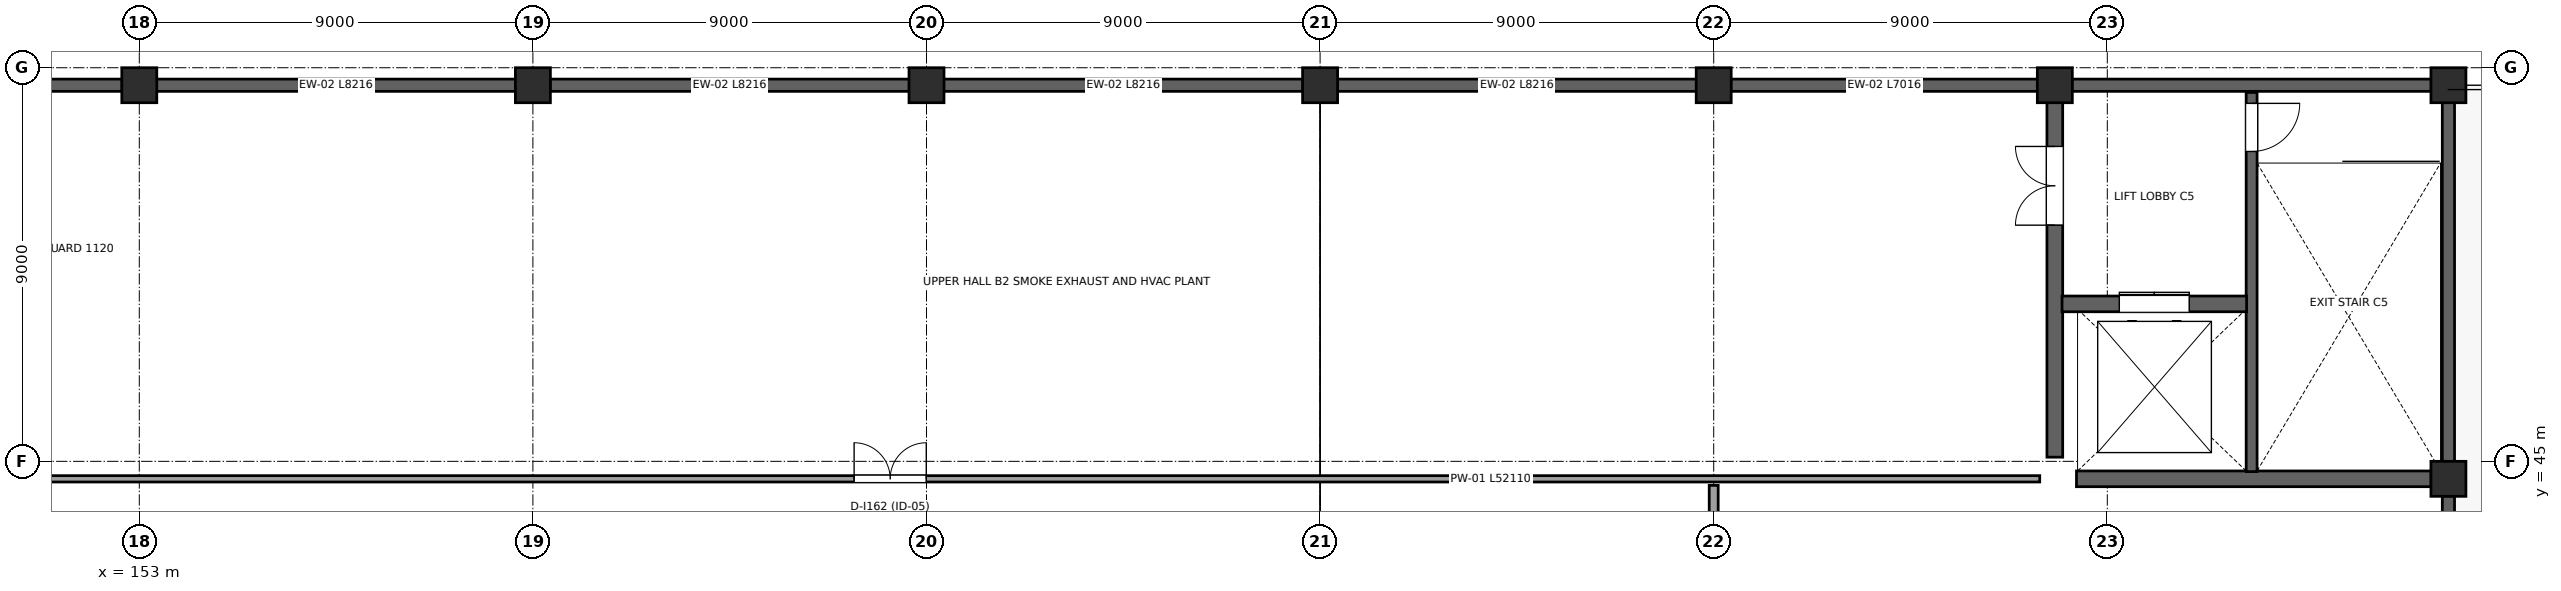
"""IFC4 building model, lengths in metres.
Left out: names, types, materials, properties, quantities, classifications, styles, units other than length and angle.
Written with IfcOpenShell. Run it as: python <this file> out.ifc"""

import sys

from ifc_helpers import new_model, si_unit, direction, frame, frame_2d, origin, origin_2d, place, context, subcontext, project, spatial, rectangle, extrude, element, fill, save


model = new_model("IFC4")
c1 = context("Model", 3, precision=1e-05, world=origin(), true_north=direction((0.0, 1.0)))
c2 = subcontext(c1, "Body", "Model", "MODEL_VIEW")
j1 = project(units=[si_unit("LENGTHUNIT", "METRE"), si_unit("PLANEANGLEUNIT", "RADIAN")], contexts=[c1])
p1 = place(None, origin())
s1 = spatial("IfcSite", under=j1, at=p1, CompositionType="ELEMENT")
p2 = place(p1, origin())
s2 = spatial("IfcBuilding", under=s1, at=p2, CompositionType="ELEMENT")
p3 = place(p2, frame((0.0, 0.0, 12.0)))
s3 = spatial("IfcBuildingStorey", under=s2, at=p3, CompositionType="ELEMENT", Elevation=12.0)
for number, where, z_axis, x_axis in (
    (1, (153.0, 53.6, 0.0), (0.0, 0.0, 1.0), (1.0, 0.0, 0.0)),
    (2, (162.0, 53.6, 0.0), (0.0, 0.0, 1.0), (1.0, 0.0, 0.0)),
    (3, (171.0, 53.6, 0.0), (0.0, 0.0, 1.0), (1.0, 0.0, 0.0)),
    (4, (180.0, 53.6, 0.0), (0.0, 0.0, 1.0), (1.0, 0.0, 0.0)),
    (5, (189.0, 53.6, 0.0), (0.0, 0.0, 1.0), (1.0, 0.0, 0.0)),
    (6, (196.8, 53.6, 0.0), (0.0, 0.0, 1.0), (1.0, 0.0, 0.0)),
    (7, (205.8, 53.6, 0.0), (0.0, 0.0, 1.0), (1.0, 0.0, 0.0)),
    (8, (205.8, 44.6, 0.0), (0.0, 0.0, 1.0), (1.0, 0.0, 0.0)),
):
    element("IfcColumn", number, at=place(p3, frame(where, z_axis=z_axis, x_axis=x_axis)), inside=s3, PredefinedType="COLUMN", context=c2, shape_type="SweptSolid", body=[
        extrude(rectangle(XDim=0.8, YDim=0.8, at=origin_2d()), origin(), (0.0, 0.0, 1.0), 4.5),
    ])
for number, where, z_axis, x_axis in (
    (9, (144.392, 53.6, 0.0), (0.0, 0.0, 1.0), (1.0, 0.0, 0.0)),
    (10, (153.392, 53.6, 0.0), (0.0, 0.0, 1.0), (1.0, 0.0, 0.0)),
    (11, (162.392, 53.6, 0.0), (0.0, 0.0, 1.0), (1.0, 0.0, 0.0)),
    (12, (171.392, 53.6, 0.0), (0.0, 0.0, 1.0), (1.0, 0.0, 0.0)),
    (13, (180.392, 53.6, 0.0), (0.0, 0.0, 1.0), (1.0, 0.0, 0.0)),
):
    element("IfcWall", number, at=place(p3, frame(where, z_axis=z_axis, x_axis=x_axis)), inside=s3, PredefinedType="STANDARD", context=c2, shape_type="SweptSolid", body=[
        extrude(rectangle(XDim=8.216, YDim=0.28, at=frame_2d((4.108, 0.0))), origin(), (0.0, 0.0, 1.0), 4.5),
    ])
p4 = place(p3, frame((189.392, 53.6, 0.0), z_axis=(0.0, 0.0, 1.0), x_axis=(1.0, 0.0, 0.0)))
e14 = element("IfcWall", 14, at=p4, inside=s3, PredefinedType="STANDARD", context=c2, shape_type="SweptSolid", body=[
    extrude(rectangle(XDim=7.016, YDim=0.28, at=frame_2d((3.508, 0.0))), origin(), (0.0, 0.0, 1.0), 4.5),
])
p5 = place(p3, frame((197.192, 53.6, 0.0), z_axis=(0.0, 0.0, 1.0), x_axis=(1.0, 0.0, 0.0)))
e15 = element("IfcWall", 15, at=p5, inside=s3, PredefinedType="STANDARD", context=c2, shape_type="SweptSolid", body=[
    extrude(rectangle(XDim=8.216, YDim=0.28, at=frame_2d((4.108, 0.0))), origin(), (0.0, 0.0, 1.0), 4.5),
])
p6 = place(p3, frame((205.8, 44.208, 0.0), z_axis=(0.0, 0.0, 1.0), x_axis=(0.0, -1.0, 0.0)))
e16 = element("IfcWall", 16, at=p6, inside=s3, PredefinedType="STANDARD", context=c2, shape_type="SweptSolid", body=[
    extrude(rectangle(XDim=7.816, YDim=0.28, at=frame_2d((3.908, 0.0))), origin(), (0.0, 0.0, 1.0), 8.8),
])
p7 = place(p6, frame((3.398, 0.0, 0.0)))
e17 = element("IfcOpeningElement", 17, at=p7, cuts=e16, PredefinedType="OPENING", context=c2, shape_type="SweptSolid", body=[
    extrude(rectangle(XDim=1.22, YDim=2.32, at=frame_2d((0.61, 1.16))), frame((0.0, 0.15, 0.0), z_axis=(0.0, -1.0, 0.0), x_axis=(1.0, 0.0, 0.0)), (0.0, 0.0, 1.0), 0.3),
])
p8 = place(p3, frame((205.8, 53.208, 0.0), z_axis=(0.0, 0.0, 1.0), x_axis=(0.0, -1.0, 0.0)))
e18 = element("IfcWall", 18, at=p8, inside=s3, PredefinedType="STANDARD", context=c2, shape_type="SweptSolid", body=[
    extrude(rectangle(XDim=8.216, YDim=0.28, at=frame_2d((4.108, 0.0))), origin(), (0.0, 0.0, 1.0), 8.8),
])
p9 = place(p3, frame((196.8, 45.095, 0.0), z_axis=(0.0, 0.0, 1.0), x_axis=(0.0, 1.0, 0.0)))
e19 = element("IfcWall", 19, at=p9, inside=s3, PredefinedType="SHEAR", context=c2, shape_type="SweptSolid", body=[
    extrude(rectangle(XDim=8.11, YDim=0.36, at=frame_2d((4.055, 0.0))), origin(), (0.0, 0.0, 1.0), 7.5),
])
p10 = place(p9, frame((5.305, 0.0, 0.0)))
e20 = element("IfcOpeningElement", 20, at=p10, cuts=e19, PredefinedType="OPENING", context=c2, shape_type="SweptSolid", body=[
    extrude(rectangle(XDim=1.8, YDim=2.3, at=frame_2d((0.9, 1.15))), frame((0.0, 0.19, 0.0), z_axis=(0.0, -1.0, 0.0), x_axis=(1.0, 0.0, 0.0)), (0.0, 0.0, 1.0), 0.38),
])
p11 = place(p3, frame((197.295, 44.6, 0.0), z_axis=(0.0, 0.0, 1.0), x_axis=(1.0, 0.0, 0.0)))
e21 = element("IfcWall", 21, at=p11, inside=s3, PredefinedType="SHEAR", context=c2, shape_type="SweptSolid", body=[
    extrude(rectangle(XDim=8.11, YDim=0.36, at=frame_2d((4.055, 0.0))), origin(), (0.0, 0.0, 1.0), 7.5),
])
p12 = place(p3, frame((201.3, 53.435, 0.0), z_axis=(0.0, 0.0, 1.0), x_axis=(0.0, -1.0, 0.0)))
e22 = element("IfcWall", 22, at=p12, inside=s3, PredefinedType="SHEAR", context=c2, shape_type="SweptSolid", body=[
    extrude(rectangle(XDim=8.67, YDim=0.25, at=frame_2d((4.335, 0.0))), origin(), (0.0, 0.0, 1.0), 7.5),
])
p13 = place(p12, frame((0.25, 0.0, 0.0)))
e23 = element("IfcOpeningElement", 23, at=p13, cuts=e22, PredefinedType="OPENING", context=c2, shape_type="SweptSolid", body=[
    extrude(rectangle(XDim=1.1, YDim=2.2, at=frame_2d((0.55, 1.1))), frame((0.0, 0.135, 0.0), z_axis=(0.0, -1.0, 0.0), x_axis=(1.0, 0.0, 0.0)), (0.0, 0.0, 1.0), 0.27),
])
p14 = place(p3, frame((196.965, 48.6, 0.0), z_axis=(0.0, 0.0, 1.0), x_axis=(1.0, 0.0, 0.0)))
e24 = element("IfcWall", 24, at=p14, inside=s3, PredefinedType="SHEAR", context=c2, shape_type="SweptSolid", body=[
    extrude(rectangle(XDim=4.22, YDim=0.36, at=frame_2d((2.11, 0.0))), origin(), (0.0, 0.0, 1.0), 7.5),
])
p15 = place(p14, frame((1.31, 0.0, 0.0)))
e25 = element("IfcOpeningElement", 25, at=p15, cuts=e24, PredefinedType="OPENING", context=c2, shape_type="SweptSolid", body=[
    extrude(rectangle(XDim=1.6, YDim=2.4, at=frame_2d((0.8, 1.2))), frame((0.0, 0.19, 0.0), z_axis=(0.0, -1.0, 0.0), x_axis=(1.0, 0.0, 0.0)), (0.0, 0.0, 1.0), 0.38),
])
p16 = place(p3, frame((144.345, 44.6, 0.0), z_axis=(0.0, 0.0, 1.0), x_axis=(1.0, 0.0, 0.0)))
e26 = element("IfcWall", 26, at=p16, inside=s3, PredefinedType="PARTITIONING", context=c2, shape_type="SweptSolid", body=[
    extrude(rectangle(XDim=52.11, YDim=0.145, at=frame_2d((26.055, 0.0))), origin(), (0.0, 0.0, 1.0), 5.5),
])
p17 = place(p16, frame((25.0, 0.0, 0.0)))
e27 = element("IfcOpeningElement", 27, at=p17, cuts=e26, PredefinedType="OPENING", context=c2, shape_type="SweptSolid", body=[
    extrude(rectangle(XDim=1.65, YDim=2.25, at=frame_2d((0.825, 1.125))), frame((0.0, 0.083, 0.0), z_axis=(0.0, -1.0, 0.0), x_axis=(1.0, 0.0, 0.0)), (0.0, 0.0, 1.0), 0.165),
])
p18 = place(p3, frame((189.0, 36.15, 0.0), z_axis=(0.0, 0.0, 1.0), x_axis=(0.0, 1.0, 0.0)))
e28 = element("IfcWall", 28, at=p18, inside=s3, PredefinedType="PARTITIONING", context=c2, shape_type="SweptSolid", body=[
    extrude(rectangle(XDim=8.3, YDim=0.205, at=frame_2d((4.15, 0.0))), origin(), (0.0, 0.0, 1.0), 5.5),
])
p19 = place(p13, origin())
e29 = element("IfcDoor", 29, at=p19, inside=s3, OperationType="SINGLE_SWING_LEFT", PredefinedType="DOOR", context=c2, shape_type="SweptSolid", body=[
    extrude(rectangle(XDim=1.1, YDim=2.2, at=frame_2d((0.55, 1.1))), frame((0.0, 0.025, 0.0), z_axis=(0.0, -1.0, 0.0), x_axis=(1.0, 0.0, 0.0)), (0.0, 0.0, 1.0), 0.05),
])
fill(e23, e29)
p20 = place(p15, origin())
e30 = element("IfcDoor", 30, at=p20, inside=s3, OperationType="DOUBLE_DOOR_SLIDING", PredefinedType="DOOR", context=c2, shape_type="SweptSolid", body=[
    extrude(rectangle(XDim=1.6, YDim=2.4, at=frame_2d((0.8, 1.2))), frame((0.0, 0.025, 0.0), z_axis=(0.0, -1.0, 0.0), x_axis=(1.0, 0.0, 0.0)), (0.0, 0.0, 1.0), 0.05),
])
fill(e25, e30)
p21 = place(p10, origin())
e31 = element("IfcDoor", 31, at=p21, inside=s3, OperationType="DOUBLE_DOOR_SINGLE_SWING", PredefinedType="DOOR", context=c2, shape_type="SweptSolid", body=[
    extrude(rectangle(XDim=1.8, YDim=2.3, at=frame_2d((0.9, 1.15))), frame((0.0, 0.025, 0.0), z_axis=(0.0, -1.0, 0.0), x_axis=(1.0, 0.0, 0.0)), (0.0, 0.0, 1.0), 0.05),
])
fill(e20, e31)
p22 = place(p17, origin())
e32 = element("IfcDoor", 32, at=p22, inside=s3, OperationType="DOUBLE_DOOR_SINGLE_SWING", PredefinedType="DOOR", context=c2, shape_type="SweptSolid", body=[
    extrude(rectangle(XDim=1.65, YDim=2.25, at=frame_2d((0.825, 1.125))), frame((0.0, 0.025, 0.0), z_axis=(0.0, -1.0, 0.0), x_axis=(1.0, 0.0, 0.0)), (0.0, 0.0, 1.0), 0.05),
])
fill(e27, e32)
save(model, sys.argv[1])
